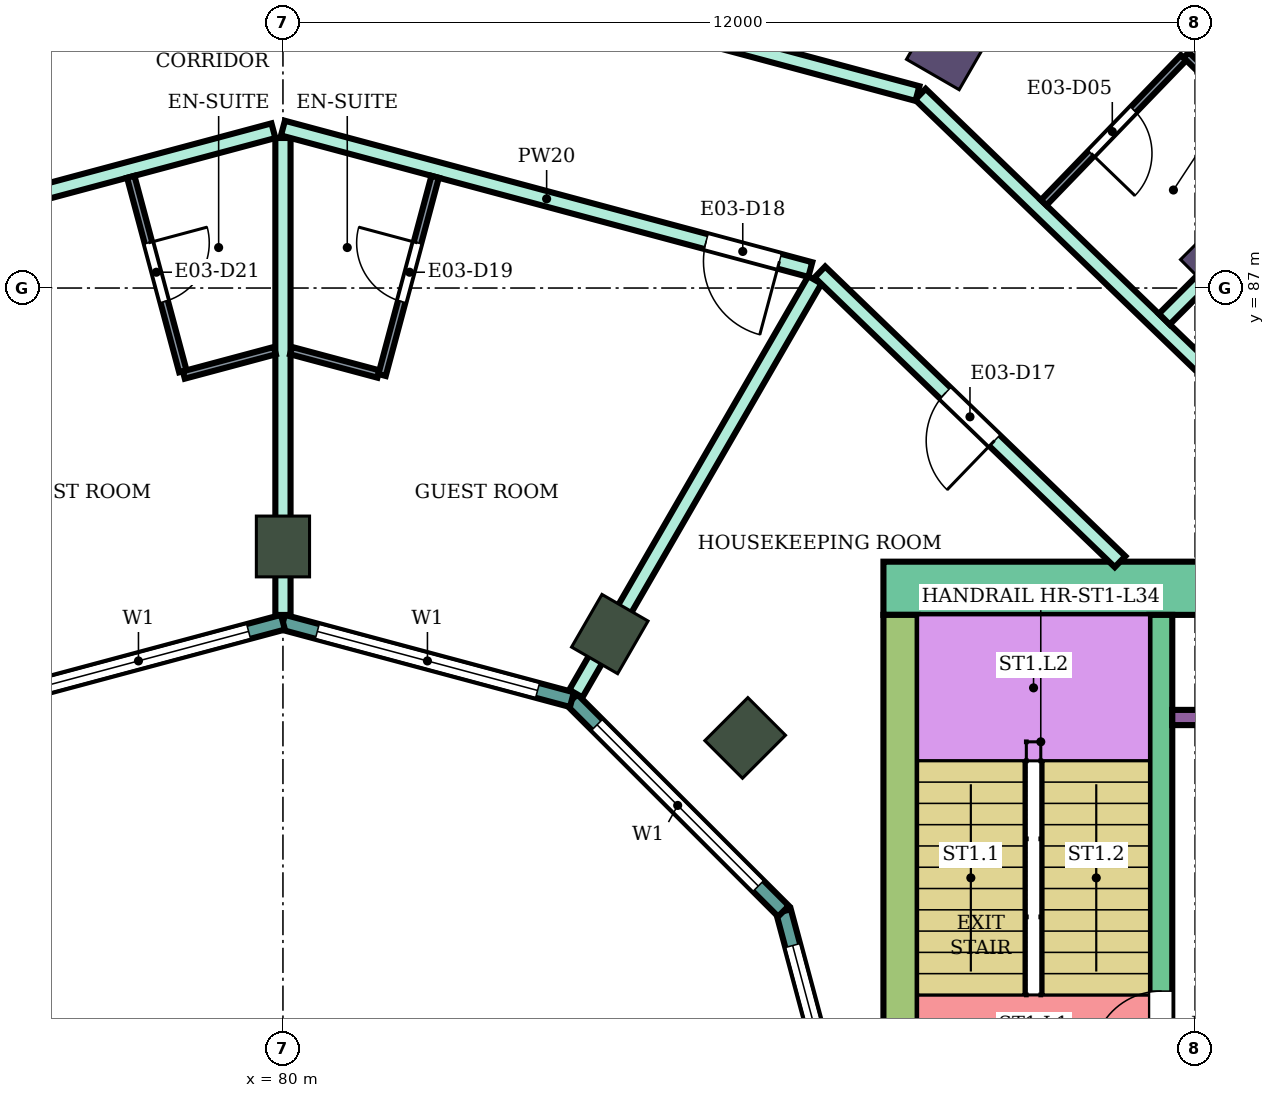
"""IFC4 building model, lengths in metres.
Left out: names, types, materials, properties, quantities, classifications, styles, units other than length and angle.
Written with IfcOpenShell. Run it as: python <this file> out.ifc"""

import sys

from ifc_helpers import new_model, si_unit, direction, frame, frame_2d, origin, origin_2d, place, context, subcontext, project, spatial, rectangle, extrude, element, fill, save


model = new_model("IFC4")
c1 = context("Model", 3, precision=1e-05, world=origin(), true_north=direction((0.0, 1.0)))
c2 = subcontext(c1, "Body", "Model", "MODEL_VIEW")
j1 = project(units=[si_unit("LENGTHUNIT", "METRE"), si_unit("PLANEANGLEUNIT", "RADIAN")], contexts=[c1])
p1 = place(None, origin())
s1 = spatial("IfcSite", under=j1, at=p1, CompositionType="ELEMENT")
p2 = place(p1, origin())
s2 = spatial("IfcBuilding", under=s1, at=p2, CompositionType="ELEMENT")
p3 = place(p2, frame((0.0, 0.0, 145.8)))
s3 = spatial("IfcBuildingStorey", under=s2, at=p3, CompositionType="ELEMENT", Elevation=145.8)
for number, where, z_axis, x_axis in (
    (1, (92.445, 87.445, 0.0), (0.0, 0.0, 1.0), (0.707, 0.707, 0.0)),
    (2, (88.8, 90.242, 0.0), (0.0, 0.0, 1.0), (0.5, 0.866, 0.0)),
):
    element("IfcColumn", number, at=place(p3, frame(where, z_axis=z_axis, x_axis=x_axis)), inside=s3, PredefinedType="COLUMN", context=c2, shape_type="SweptSolid", body=[
        extrude(rectangle(XDim=1.0, YDim=0.8, at=origin_2d()), origin(), (0.0, 0.0, 1.0), 3.9),
    ])
for number, where, z_axis, x_axis in (
    (3, (86.081, 81.081, 0.0), (0.0, 0.0, 1.0), (0.707, 0.707, 0.0)),
    (4, (84.3, 82.448, 0.0), (0.0, 0.0, 1.0), (0.5, 0.866, 0.0)),
    (5, (80.0, 83.6, 0.0), (0.0, 0.0, 1.0), (0.0, 1.0, 0.0)),
):
    element("IfcColumn", number, at=place(p3, frame(where, z_axis=z_axis, x_axis=x_axis)), inside=s3, PredefinedType="COLUMN", context=c2, shape_type="SweptSolid", body=[
        extrude(rectangle(XDim=0.8, YDim=0.7, at=origin_2d()), origin(), (0.0, 0.0, 1.0), 3.9),
    ])
p4 = place(p3, frame((87.9, 83.05, 0.0), z_axis=(0.0, 0.0, 1.0), x_axis=(1.0, 0.0, 0.0)))
e6 = element("IfcWall", 6, at=p4, inside=s3, PredefinedType="SHEAR", context=c2, shape_type="SweptSolid", body=[
    extrude(rectangle(XDim=14.8, YDim=0.7, at=frame_2d((7.4, 0.0))), origin(), (0.0, 0.0, 1.0), 3.5),
])
p5 = place(p4, frame((4.2, 0.0, 0.0)))
e7 = element("IfcOpeningElement", 7, at=p5, cuts=e6, PredefinedType="OPENING", context=c2, shape_type="SweptSolid", body=[
    extrude(rectangle(XDim=2.4, YDim=2.4, at=frame_2d((1.2, 1.2))), frame((0.0, 0.36, 0.0), z_axis=(0.0, -1.0, 0.0), x_axis=(1.0, 0.0, 0.0)), (0.0, 0.0, 1.0), 0.72),
])
p6 = place(p3, frame((88.125, 75.0, 0.0), z_axis=(0.0, 0.0, 1.0), x_axis=(0.0, 1.0, 0.0)))
e8 = element("IfcWall", 8, at=p6, inside=s3, PredefinedType="SHEAR", context=c2, shape_type="SweptSolid", body=[
    extrude(rectangle(XDim=7.7, YDim=0.45, at=frame_2d((3.85, 0.0))), origin(), (0.0, 0.0, 1.0), 3.5),
])
p7 = place(p3, frame((91.55, 75.0, 0.0), z_axis=(0.0, 0.0, 1.0), x_axis=(0.0, 1.0, 0.0)))
e9 = element("IfcWall", 9, at=p7, inside=s3, PredefinedType="SHEAR", context=c2, shape_type="SweptSolid", body=[
    extrude(rectangle(XDim=7.7, YDim=0.3, at=frame_2d((3.85, 0.0))), origin(), (0.0, 0.0, 1.0), 3.5),
])
p8 = place(p7, frame((1.85, 0.0, 0.0)))
e10 = element("IfcOpeningElement", 10, at=p8, cuts=e9, PredefinedType="OPENING", context=c2, shape_type="SweptSolid", body=[
    extrude(rectangle(XDim=0.9, YDim=2.1, at=frame_2d((0.45, 1.05))), frame((0.0, 0.16, 0.0), z_axis=(0.0, -1.0, 0.0), x_axis=(1.0, 0.0, 0.0)), (0.0, 0.0, 1.0), 0.32),
])
p9 = place(p3, frame((91.7, 81.35, 0.0), z_axis=(0.0, 0.0, 1.0), x_axis=(1.0, 0.0, 0.0)))
e11 = element("IfcWall", 11, at=p9, inside=s3, PredefinedType="SHEAR", context=c2, shape_type="SweptSolid", body=[
    extrude(rectangle(XDim=4.5, YDim=0.2, at=frame_2d((2.25, 0.0))), origin(), (0.0, 0.0, 1.0), 3.5),
])
p10 = place(p3, frame((87.604, 75.0, 0.0), z_axis=(0.0, 0.0, 1.0), x_axis=(-0.258789828301, 0.965933654434, 0.0)))
e12 = element("IfcWall", 12, at=p10, inside=s3, PredefinedType="NOTDEFINED", context=c2, shape_type="SweptSolid", body=[
    extrude(rectangle(XDim=3.936, YDim=0.2, at=frame_2d((1.968, 0.0))), origin(), (0.0, 0.0, 1.0), 3.9),
])
p11 = place(p10, frame((0.468, 0.0, 0.9)))
e13 = element("IfcOpeningElement", 13, at=p11, cuts=e12, PredefinedType="OPENING", context=c2, shape_type="SweptSolid", body=[
    extrude(rectangle(XDim=3.0, YDim=2.3, at=frame_2d((1.5, 1.15))), frame((0.0, 0.11, 0.0), z_axis=(0.0, -1.0, 0.0), x_axis=(1.0, 0.0, 0.0)), (0.0, 0.0, 1.0), 0.22),
])
p12 = place(p3, frame((86.585, 78.802, 0.0), z_axis=(0.0, 0.0, 1.0), x_axis=(-0.707106781187, 0.707106781187, 0.0)))
e14 = element("IfcWall", 14, at=p12, inside=s3, PredefinedType="NOTDEFINED", context=c2, shape_type="SweptSolid", body=[
    extrude(rectangle(XDim=3.936, YDim=0.2, at=frame_2d((1.968, 0.0))), origin(), (0.0, 0.0, 1.0), 3.9),
])
p13 = place(p12, frame((0.468, 0.0, 0.9)))
e15 = element("IfcOpeningElement", 15, at=p13, cuts=e14, PredefinedType="OPENING", context=c2, shape_type="SweptSolid", body=[
    extrude(rectangle(XDim=3.0, YDim=2.3, at=frame_2d((1.5, 1.15))), frame((0.0, 0.11, 0.0), z_axis=(0.0, -1.0, 0.0), x_axis=(1.0, 0.0, 0.0)), (0.0, 0.0, 1.0), 0.22),
])
p14 = place(p3, frame((83.802, 81.585, 0.0), z_axis=(0.0, 0.0, 1.0), x_axis=(-0.965933654434, 0.258789828301, 0.0)))
e16 = element("IfcWall", 16, at=p14, inside=s3, PredefinedType="NOTDEFINED", context=c2, shape_type="SweptSolid", body=[
    extrude(rectangle(XDim=3.936, YDim=0.2, at=frame_2d((1.968, 0.0))), origin(), (0.0, 0.0, 1.0), 3.9),
])
p15 = place(p14, frame((0.468, 0.0, 0.9)))
e17 = element("IfcOpeningElement", 17, at=p15, cuts=e16, PredefinedType="OPENING", context=c2, shape_type="SweptSolid", body=[
    extrude(rectangle(XDim=3.0, YDim=2.3, at=frame_2d((1.5, 1.15))), frame((0.0, 0.11, 0.0), z_axis=(0.0, -1.0, 0.0), x_axis=(1.0, 0.0, 0.0)), (0.0, 0.0, 1.0), 0.22),
])
p16 = place(p3, frame((80.0, 82.604, 0.0), z_axis=(0.0, 0.0, 1.0), x_axis=(-0.965933654434, -0.258789828301, 0.0)))
e18 = element("IfcWall", 18, at=p16, inside=s3, PredefinedType="NOTDEFINED", context=c2, shape_type="SweptSolid", body=[
    extrude(rectangle(XDim=3.936, YDim=0.2, at=frame_2d((1.968, 0.0))), origin(), (0.0, 0.0, 1.0), 3.9),
])
p17 = place(p16, frame((0.468, 0.0, 0.9)))
e19 = element("IfcOpeningElement", 19, at=p17, cuts=e18, PredefinedType="OPENING", context=c2, shape_type="SweptSolid", body=[
    extrude(rectangle(XDim=3.0, YDim=2.3, at=frame_2d((1.5, 1.15))), frame((0.0, 0.11, 0.0), z_axis=(0.0, -1.0, 0.0), x_axis=(1.0, 0.0, 0.0)), (0.0, 0.0, 1.0), 0.22),
])
p18 = place(p3, frame((71.614, 89.55, 0.0), z_axis=(0.0, 0.0, 1.0), x_axis=(0.965982156828, 0.258608725086, 0.0)))
e20 = element("IfcWall", 20, at=p18, inside=s3, PredefinedType="PARTITIONING", context=c2, shape_type="SweptSolid", body=[
    extrude(rectangle(XDim=8.592, YDim=0.2, at=frame_2d((4.296, 0.0))), origin(), (0.0, 0.0, 1.0), 3.45),
])
p19 = place(p18, frame((4.865, 0.0, 0.0)))
e21 = element("IfcOpeningElement", 21, at=p19, cuts=e20, PredefinedType="OPENING", context=c2, shape_type="SweptSolid", body=[
    extrude(rectangle(XDim=1.0, YDim=2.1, at=frame_2d((0.5, 1.05))), frame((0.0, 0.11, 0.0), z_axis=(0.0, -1.0, 0.0), x_axis=(1.0, 0.0, 0.0)), (0.0, 0.0, 1.0), 0.22),
])
p20 = place(p18, frame((2.804, 0.0, 0.0)))
e22 = element("IfcOpeningElement", 22, at=p20, cuts=e20, PredefinedType="OPENING", context=c2, shape_type="SweptSolid", body=[
    extrude(rectangle(XDim=1.0, YDim=2.1, at=frame_2d((0.5, 1.05))), frame((0.0, 0.11, 0.0), z_axis=(0.0, -1.0, 0.0), x_axis=(1.0, 0.0, 0.0)), (0.0, 0.0, 1.0), 0.22),
])
p21 = place(p3, frame((73.071, 87.247, 0.0), z_axis=(0.0, 0.0, 1.0), x_axis=(0.965931651205, 0.258797305243, 0.0)))
e23 = element("IfcWall", 23, at=p21, inside=s3, PredefinedType="PARTITIONING", context=c2, shape_type="SweptSolid", body=[
    extrude(rectangle(XDim=7.043, YDim=0.2, at=frame_2d((3.521, 0.0))), origin(), (0.0, 0.0, 1.0), 3.45),
])
p22 = place(p21, frame((0.41, 0.0, 0.0)))
e24 = element("IfcOpeningElement", 24, at=p22, cuts=e23, PredefinedType="OPENING", context=c2, shape_type="SweptSolid", body=[
    extrude(rectangle(XDim=1.0, YDim=2.1, at=frame_2d((0.5, 1.05))), frame((0.0, 0.11, 0.0), z_axis=(0.0, -1.0, 0.0), x_axis=(1.0, 0.0, 0.0)), (0.0, 0.0, 1.0), 0.22),
])
p23 = place(p3, frame((80.0, 82.699, 0.0), z_axis=(0.0, 0.0, 1.0), x_axis=(0.0, 1.0, 0.0)))
e25 = element("IfcWall", 25, at=p23, inside=s3, PredefinedType="PARTITIONING", context=c2, shape_type="SweptSolid", body=[
    extrude(rectangle(XDim=6.275, YDim=0.2, at=frame_2d((3.138, 0.0))), origin(), (0.0, 0.0, 1.0), 3.45),
])
p24 = place(p3, frame((80.0, 89.104, 0.0), z_axis=(0.0, 0.0, 1.0), x_axis=(0.965854247166, -0.25908603442, 0.0)))
e26 = element("IfcWall", 26, at=p24, inside=s3, PredefinedType="PARTITIONING", context=c2, shape_type="SweptSolid", body=[
    extrude(rectangle(XDim=7.183, YDim=0.2, at=frame_2d((3.592, 0.0))), origin(), (0.0, 0.0, 1.0), 3.45),
])
p25 = place(p24, frame((5.763, 0.0, 0.0)))
e27 = element("IfcOpeningElement", 27, at=p25, cuts=e26, PredefinedType="OPENING", context=c2, shape_type="SweptSolid", body=[
    extrude(rectangle(XDim=1.0, YDim=2.1, at=frame_2d((0.5, 1.05))), frame((0.0, 0.11, 0.0), z_axis=(0.0, -1.0, 0.0), x_axis=(1.0, 0.0, 0.0)), (0.0, 0.0, 1.0), 0.22),
])
p26 = place(p3, frame((80.0, 91.796, 0.0), z_axis=(0.0, 0.0, 1.0), x_axis=(0.965891796243, -0.258946013582, 0.0)))
e28 = element("IfcWall", 28, at=p26, inside=s3, PredefinedType="PARTITIONING", context=c2, shape_type="SweptSolid", body=[
    extrude(rectangle(XDim=8.642, YDim=0.2, at=frame_2d((4.321, 0.0))), origin(), (0.0, 0.0, 1.0), 3.45),
])
p27 = place(p26, frame((4.877, 0.0, 0.0)))
e29 = element("IfcOpeningElement", 29, at=p27, cuts=e28, PredefinedType="OPENING", context=c2, shape_type="SweptSolid", body=[
    extrude(rectangle(XDim=1.0, YDim=2.1, at=frame_2d((0.5, 1.05))), frame((0.0, 0.11, 0.0), z_axis=(0.0, -1.0, 0.0), x_axis=(1.0, 0.0, 0.0)), (0.0, 0.0, 1.0), 0.22),
])
p28 = place(p26, frame((2.817, 0.0, 0.0)))
e30 = element("IfcOpeningElement", 30, at=p28, cuts=e28, PredefinedType="OPENING", context=c2, shape_type="SweptSolid", body=[
    extrude(rectangle(XDim=1.0, YDim=2.1, at=frame_2d((0.5, 1.05))), frame((0.0, 0.11, 0.0), z_axis=(0.0, -1.0, 0.0), x_axis=(1.0, 0.0, 0.0)), (0.0, 0.0, 1.0), 0.22),
])
p29 = place(p3, frame((83.854, 81.665, 0.0), z_axis=(0.0, 0.0, 1.0), x_axis=(0.500241355856, 0.865886012066, 0.0)))
e31 = element("IfcWall", 31, at=p29, inside=s3, PredefinedType="PARTITIONING", context=c2, shape_type="SweptSolid", body=[
    extrude(rectangle(XDim=6.285, YDim=0.2, at=frame_2d((3.143, 0.0))), origin(), (0.0, 0.0, 1.0), 3.45),
])
p30 = place(p3, frame((87.064, 87.211, 0.0), z_axis=(0.0, 0.0, 1.0), x_axis=(0.719562412484, -0.694427774891, 0.0)))
e32 = element("IfcWall", 32, at=p30, inside=s3, PredefinedType="PARTITIONING", context=c2, shape_type="SweptSolid", body=[
    extrude(rectangle(XDim=5.488, YDim=0.2, at=frame_2d((2.744, 0.0))), origin(), (0.0, 0.0, 1.0), 3.45),
])
p31 = place(p30, frame((2.294, 0.0, 0.0)))
e33 = element("IfcOpeningElement", 33, at=p31, cuts=e32, PredefinedType="OPENING", context=c2, shape_type="SweptSolid", body=[
    extrude(rectangle(XDim=0.9, YDim=2.1, at=frame_2d((0.45, 1.05))), frame((0.0, 0.11, 0.0), z_axis=(0.0, -1.0, 0.0), x_axis=(1.0, 0.0, 0.0)), (0.0, 0.0, 1.0), 0.22),
])
p32 = place(p3, frame((88.386, 89.549, 0.0), z_axis=(0.0, 0.0, 1.0), x_axis=(0.719507339337, -0.694484836869, 0.0)))
e34 = element("IfcWall", 34, at=p32, inside=s3, PredefinedType="PARTITIONING", context=c2, shape_type="SweptSolid", body=[
    extrude(rectangle(XDim=6.635, YDim=0.2, at=frame_2d((3.317, 0.0))), origin(), (0.0, 0.0, 1.0), 3.45),
])
p33 = place(p3, frame((91.595, 86.591, 0.0), z_axis=(0.0, 0.0, 1.0), x_axis=(0.707214399597, 0.706999146394, 0.0)))
e35 = element("IfcWall", 35, at=p33, inside=s3, PredefinedType="PARTITIONING", context=c2, shape_type="SweptSolid", body=[
    extrude(rectangle(XDim=6.805, YDim=0.2, at=frame_2d((3.403, 0.0))), origin(), (0.0, 0.0, 1.0), 3.45),
])
p34 = place(p3, frame((77.998, 88.463, 0.0), z_axis=(0.0, 0.0, 1.0), x_axis=(0.258677737588, -0.965963678446, 0.0)))
e36 = element("IfcWall", 36, at=p34, inside=s3, PredefinedType="PARTITIONING", context=c2, shape_type="SweptSolid", body=[
    extrude(rectangle(XDim=2.649, YDim=0.1, at=frame_2d((1.325, 0.0))), origin(), (0.0, 0.0, 1.0), 3.45),
])
p35 = place(p34, frame((0.9, 0.0, 0.0)))
e37 = element("IfcOpeningElement", 37, at=p35, cuts=e36, PredefinedType="OPENING", context=c2, shape_type="SweptSolid", body=[
    extrude(rectangle(XDim=0.8, YDim=2.1, at=frame_2d((0.4, 1.05))), frame((0.0, 0.06, 0.0), z_axis=(0.0, -1.0, 0.0), x_axis=(1.0, 0.0, 0.0)), (0.0, 0.0, 1.0), 0.12),
])
p36 = place(p3, frame((78.696, 85.856, 0.0), z_axis=(0.0, 0.0, 1.0), x_axis=(0.966002513606, 0.258532674351, 0.0)))
e38 = element("IfcWall", 38, at=p36, inside=s3, PredefinedType="PARTITIONING", context=c2, shape_type="SweptSolid", body=[
    extrude(rectangle(XDim=1.24, YDim=0.1, at=frame_2d((0.62, 0.0))), origin(), (0.0, 0.0, 1.0), 3.45),
])
p37 = place(p3, frame((80.106, 86.177, 0.0), z_axis=(0.0, 0.0, 1.0), x_axis=(0.966002973184, -0.258530957139, 0.0)))
e39 = element("IfcWall", 39, at=p37, inside=s3, PredefinedType="PARTITIONING", context=c2, shape_type="SweptSolid", body=[
    extrude(rectangle(XDim=1.19, YDim=0.1, at=frame_2d((0.595, 0.0))), origin(), (0.0, 0.0, 1.0), 3.45),
])
p38 = place(p3, frame((81.304, 85.856, 0.0), z_axis=(0.0, 0.0, 1.0), x_axis=(0.25867580527, 0.965964195904, 0.0)))
e40 = element("IfcWall", 40, at=p38, inside=s3, PredefinedType="PARTITIONING", context=c2, shape_type="SweptSolid", body=[
    extrude(rectangle(XDim=2.699, YDim=0.1, at=frame_2d((1.35, 0.0))), origin(), (0.0, 0.0, 1.0), 3.45),
])
p39 = place(p38, frame((1.0, 0.0, 0.0)))
e41 = element("IfcOpeningElement", 41, at=p39, cuts=e40, PredefinedType="OPENING", context=c2, shape_type="SweptSolid", body=[
    extrude(rectangle(XDim=0.8, YDim=2.1, at=frame_2d((0.4, 1.05))), frame((0.0, 0.06, 0.0), z_axis=(0.0, -1.0, 0.0), x_axis=(1.0, 0.0, 0.0)), (0.0, 0.0, 1.0), 0.12),
])
p40 = place(p3, frame((90.008, 88.123, 0.0), z_axis=(0.0, 0.0, 1.0), x_axis=(0.694372521817, 0.719615731447, 0.0)))
e42 = element("IfcWall", 42, at=p40, inside=s3, PredefinedType="PARTITIONING", context=c2, shape_type="SweptSolid", body=[
    extrude(rectangle(XDim=2.65, YDim=0.1, at=frame_2d((1.325, 0.0))), origin(), (0.0, 0.0, 1.0), 3.45),
])
p41 = place(p40, frame((0.9, 0.0, 0.0)))
e43 = element("IfcOpeningElement", 43, at=p41, cuts=e42, PredefinedType="OPENING", context=c2, shape_type="SweptSolid", body=[
    extrude(rectangle(XDim=0.8, YDim=2.1, at=frame_2d((0.4, 1.05))), frame((0.0, 0.06, 0.0), z_axis=(0.0, -1.0, 0.0), x_axis=(1.0, 0.0, 0.0)), (0.0, 0.0, 1.0), 0.12),
])
p42 = place(p3, frame((91.883, 90.066, 0.0), z_axis=(0.0, 0.0, 1.0), x_axis=(0.719460839421, -0.694533008963, 0.0)))
e44 = element("IfcWall", 44, at=p42, inside=s3, PredefinedType="PARTITIONING", context=c2, shape_type="SweptSolid", body=[
    extrude(rectangle(XDim=4.25, YDim=0.1, at=frame_2d((2.125, 0.0))), origin(), (0.0, 0.0, 1.0), 3.45),
])
p43 = place(p11, origin())
e45 = element("IfcWindow", 45, at=p43, inside=s3, PartitioningType="SINGLE_PANEL", PredefinedType="WINDOW", context=c2, shape_type="SweptSolid", body=[
    extrude(rectangle(XDim=3.0, YDim=2.3, at=frame_2d((1.5, 1.15))), frame((0.0, 0.03, 0.0), z_axis=(0.0, -1.0, 0.0), x_axis=(1.0, 0.0, 0.0)), (0.0, 0.0, 1.0), 0.06),
])
fill(e13, e45)
p44 = place(p13, origin())
e46 = element("IfcWindow", 46, at=p44, inside=s3, PartitioningType="SINGLE_PANEL", PredefinedType="WINDOW", context=c2, shape_type="SweptSolid", body=[
    extrude(rectangle(XDim=3.0, YDim=2.3, at=frame_2d((1.5, 1.15))), frame((0.0, 0.03, 0.0), z_axis=(0.0, -1.0, 0.0), x_axis=(1.0, 0.0, 0.0)), (0.0, 0.0, 1.0), 0.06),
])
fill(e15, e46)
p45 = place(p15, origin())
e47 = element("IfcWindow", 47, at=p45, inside=s3, PartitioningType="SINGLE_PANEL", PredefinedType="WINDOW", context=c2, shape_type="SweptSolid", body=[
    extrude(rectangle(XDim=3.0, YDim=2.3, at=frame_2d((1.5, 1.15))), frame((0.0, 0.03, 0.0), z_axis=(0.0, -1.0, 0.0), x_axis=(1.0, 0.0, 0.0)), (0.0, 0.0, 1.0), 0.06),
])
fill(e17, e47)
p46 = place(p17, origin())
e48 = element("IfcWindow", 48, at=p46, inside=s3, PartitioningType="SINGLE_PANEL", PredefinedType="WINDOW", context=c2, shape_type="SweptSolid", body=[
    extrude(rectangle(XDim=3.0, YDim=2.3, at=frame_2d((1.5, 1.15))), frame((0.0, 0.03, 0.0), z_axis=(0.0, -1.0, 0.0), x_axis=(1.0, 0.0, 0.0)), (0.0, 0.0, 1.0), 0.06),
])
fill(e19, e48)
p47 = place(p41, frame((0.8, 0.0, 0.0), z_axis=(0.0, 0.0, 1.0), x_axis=(-1.0, 0.0, 0.0)))
e49 = element("IfcDoor", 49, at=p47, inside=s3, OperationType="SINGLE_SWING_RIGHT", PredefinedType="DOOR", context=c2, shape_type="SweptSolid", body=[
    extrude(rectangle(XDim=0.8, YDim=2.1, at=frame_2d((0.4, 1.05))), frame((0.0, 0.025, 0.0), z_axis=(0.0, -1.0, 0.0), x_axis=(1.0, 0.0, 0.0)), (0.0, 0.0, 1.0), 0.05),
])
fill(e43, e49)
p48 = place(p31, frame((0.9, 0.0, 0.0), z_axis=(0.0, 0.0, 1.0), x_axis=(-1.0, 0.0, 0.0)))
e50 = element("IfcDoor", 50, at=p48, inside=s3, OperationType="SINGLE_SWING_LEFT", PredefinedType="DOOR", context=c2, shape_type="SweptSolid", body=[
    extrude(rectangle(XDim=0.9, YDim=2.1, at=frame_2d((0.45, 1.05))), frame((0.0, 0.025, 0.0), z_axis=(0.0, -1.0, 0.0), x_axis=(1.0, 0.0, 0.0)), (0.0, 0.0, 1.0), 0.05),
])
fill(e33, e50)
p49 = place(p25, frame((1.0, 0.0, 0.0), z_axis=(0.0, 0.0, 1.0), x_axis=(-1.0, 0.0, 0.0)))
e51 = element("IfcDoor", 51, at=p49, inside=s3, OperationType="SINGLE_SWING_LEFT", PredefinedType="DOOR", context=c2, shape_type="SweptSolid", body=[
    extrude(rectangle(XDim=1.0, YDim=2.1, at=frame_2d((0.5, 1.05))), frame((0.0, 0.025, 0.0), z_axis=(0.0, -1.0, 0.0), x_axis=(1.0, 0.0, 0.0)), (0.0, 0.0, 1.0), 0.05),
])
fill(e27, e51)
p50 = place(p39, origin())
e52 = element("IfcDoor", 52, at=p50, inside=s3, OperationType="SINGLE_SWING_RIGHT", PredefinedType="DOOR", context=c2, shape_type="SweptSolid", body=[
    extrude(rectangle(XDim=0.8, YDim=2.1, at=frame_2d((0.4, 1.05))), frame((0.0, 0.025, 0.0), z_axis=(0.0, -1.0, 0.0), x_axis=(1.0, 0.0, 0.0)), (0.0, 0.0, 1.0), 0.05),
])
fill(e41, e52)
p51 = place(p35, origin())
e53 = element("IfcDoor", 53, at=p51, inside=s3, OperationType="SINGLE_SWING_LEFT", PredefinedType="DOOR", context=c2, shape_type="SweptSolid", body=[
    extrude(rectangle(XDim=0.8, YDim=2.1, at=frame_2d((0.4, 1.05))), frame((0.0, 0.025, 0.0), z_axis=(0.0, -1.0, 0.0), x_axis=(1.0, 0.0, 0.0)), (0.0, 0.0, 1.0), 0.05),
])
fill(e37, e53)
p52 = place(p8, origin())
e54 = element("IfcDoor", 54, at=p52, inside=s3, OperationType="SINGLE_SWING_LEFT", PredefinedType="DOOR", context=c2, shape_type="SweptSolid", body=[
    extrude(rectangle(XDim=0.9, YDim=2.1, at=frame_2d((0.45, 1.05))), frame((0.0, 0.025, 0.0), z_axis=(0.0, -1.0, 0.0), x_axis=(1.0, 0.0, 0.0)), (0.0, 0.0, 1.0), 0.05),
])
fill(e10, e54)
save(model, sys.argv[1])
